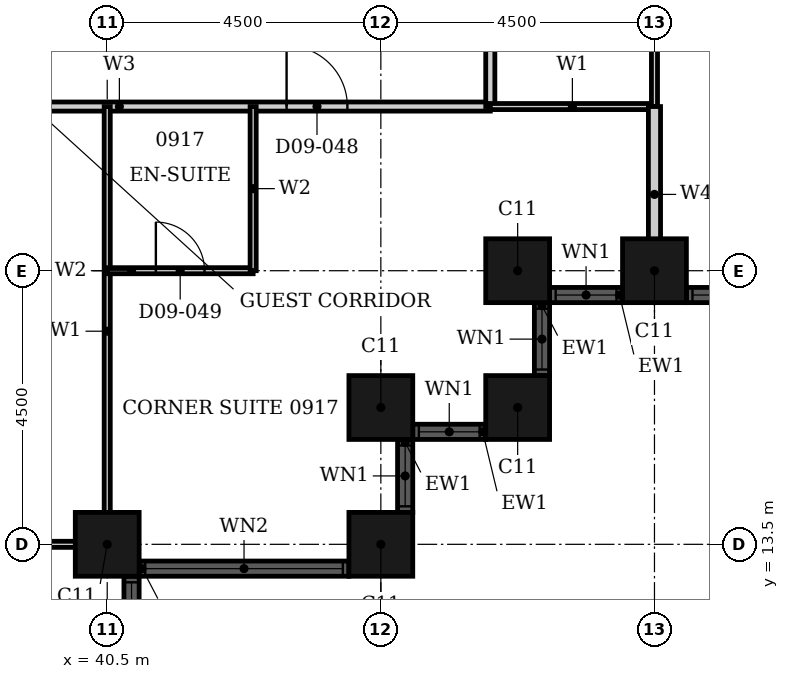
"""IFC4 building model, lengths in metres.
Left out: names, types, materials, properties, quantities, classifications, styles, units other than length and angle.
Written with IfcOpenShell. Run it as: python <this file> out.ifc"""

import sys

from ifc_helpers import new_model, si_unit, direction, frame, frame_2d, origin, origin_2d, place, context, subcontext, project, spatial, rectangle, hollow_rectangle, extrude, element, fill, save


model = new_model("IFC4")
c1 = context("Model", 3, precision=1e-05, world=origin(), true_north=direction((0.0, 1.0)))
c2 = subcontext(c1, "Body", "Model", "MODEL_VIEW")
j1 = project(units=[si_unit("LENGTHUNIT", "METRE"), si_unit("PLANEANGLEUNIT", "RADIAN")], contexts=[c1])
p1 = place(None, origin())
s1 = spatial("IfcSite", under=j1, at=p1, CompositionType="ELEMENT")
p2 = place(p1, origin())
s2 = spatial("IfcBuilding", under=s1, at=p2, CompositionType="ELEMENT")
p3 = place(p2, frame((0.0, 0.0, 44.4)))
s3 = spatial("IfcBuildingStorey", under=s2, at=p3, CompositionType="ELEMENT", Elevation=44.4)
for number, where, z_axis, x_axis in (
    (1, (40.5, 13.5, 0.0), (0.0, 0.0, 1.0), (1.0, 0.0, 0.0)),
    (2, (45.0, 13.5, 0.0), (0.0, 0.0, 1.0), (1.0, 0.0, 0.0)),
    (3, (45.0, 15.75, 0.0), (0.0, 0.0, 1.0), (1.0, 0.0, 0.0)),
    (4, (47.25, 15.75, 0.0), (0.0, 0.0, 1.0), (1.0, 0.0, 0.0)),
    (5, (47.25, 18.0, 0.0), (0.0, 0.0, 1.0), (1.0, 0.0, 0.0)),
    (6, (49.5, 18.0, 0.0), (0.0, 0.0, 1.0), (1.0, 0.0, 0.0)),
):
    element("IfcColumn", number, at=place(p3, frame(where, z_axis=z_axis, x_axis=x_axis)), inside=s3, PredefinedType="COLUMN", context=c2, shape_type="SweptSolid", body=[
        extrude(hollow_rectangle(XDim=1.05, YDim=1.05, WallThickness=0.034, at=origin_2d()), origin(), (0.0, 0.0, 1.0), 3.6),
    ])
p4 = place(p3, frame((40.9, 5.025, 0.0), z_axis=(0.0, 0.0, 1.0), x_axis=(0.0, 1.0, 0.0)))
e7 = element("IfcWall", 7, at=p4, inside=s3, PredefinedType="SOLIDWALL", context=c2, shape_type="SweptSolid", body=[
    extrude(rectangle(XDim=7.95, YDim=0.25, at=frame_2d((3.975, 0.0))), origin(), (0.0, 0.0, 1.0), 3.6),
])
p5 = place(p4, frame((0.1, 0.0, 0.9)))
e8 = element("IfcOpeningElement", 8, at=p5, cuts=e7, PredefinedType="OPENING", context=c2, shape_type="SweptSolid", body=[
    extrude(rectangle(XDim=3.25, YDim=2.08, at=frame_2d((1.625, 1.04))), frame((0.0, 0.135, 0.0), z_axis=(0.0, -1.0, 0.0), x_axis=(1.0, 0.0, 0.0)), (0.0, 0.0, 1.0), 0.27),
])
p6 = place(p4, frame((4.6, 0.0, 0.9)))
e9 = element("IfcOpeningElement", 9, at=p6, cuts=e7, PredefinedType="OPENING", context=c2, shape_type="SweptSolid", body=[
    extrude(rectangle(XDim=3.25, YDim=2.08, at=frame_2d((1.625, 1.04))), frame((0.0, 0.135, 0.0), z_axis=(0.0, -1.0, 0.0), x_axis=(1.0, 0.0, 0.0)), (0.0, 0.0, 1.0), 0.27),
])
p7 = place(p3, frame((41.025, 13.1, 0.0), z_axis=(0.0, 0.0, 1.0), x_axis=(1.0, 0.0, 0.0)))
e10 = element("IfcWall", 10, at=p7, inside=s3, PredefinedType="SOLIDWALL", context=c2, shape_type="SweptSolid", body=[
    extrude(rectangle(XDim=3.45, YDim=0.25, at=frame_2d((1.725, 0.0))), origin(), (0.0, 0.0, 1.0), 3.6),
])
p8 = place(p7, frame((0.1, 0.0, 0.9)))
e11 = element("IfcOpeningElement", 11, at=p8, cuts=e10, PredefinedType="OPENING", context=c2, shape_type="SweptSolid", body=[
    extrude(rectangle(XDim=3.25, YDim=2.08, at=frame_2d((1.625, 1.04))), frame((0.0, 0.135, 0.0), z_axis=(0.0, -1.0, 0.0), x_axis=(1.0, 0.0, 0.0)), (0.0, 0.0, 1.0), 0.27),
])
p9 = place(p3, frame((45.4, 14.025, 0.0), z_axis=(0.0, 0.0, 1.0), x_axis=(0.0, 1.0, 0.0)))
e12 = element("IfcWall", 12, at=p9, inside=s3, PredefinedType="SOLIDWALL", context=c2, shape_type="SweptSolid", body=[
    extrude(rectangle(XDim=1.2, YDim=0.25, at=frame_2d((0.6, 0.0))), origin(), (0.0, 0.0, 1.0), 3.6),
])
p10 = place(p9, frame((0.1, 0.0, 0.9)))
e13 = element("IfcOpeningElement", 13, at=p10, cuts=e12, PredefinedType="OPENING", context=c2, shape_type="SweptSolid", body=[
    extrude(rectangle(XDim=1.0, YDim=2.08, at=frame_2d((0.5, 1.04))), frame((0.0, 0.135, 0.0), z_axis=(0.0, -1.0, 0.0), x_axis=(1.0, 0.0, 0.0)), (0.0, 0.0, 1.0), 0.27),
])
p11 = place(p3, frame((45.525, 15.35, 0.0), z_axis=(0.0, 0.0, 1.0), x_axis=(1.0, 0.0, 0.0)))
e14 = element("IfcWall", 14, at=p11, inside=s3, PredefinedType="SOLIDWALL", context=c2, shape_type="SweptSolid", body=[
    extrude(rectangle(XDim=1.2, YDim=0.25, at=frame_2d((0.6, 0.0))), origin(), (0.0, 0.0, 1.0), 3.6),
])
p12 = place(p11, frame((0.1, 0.0, 0.9)))
e15 = element("IfcOpeningElement", 15, at=p12, cuts=e14, PredefinedType="OPENING", context=c2, shape_type="SweptSolid", body=[
    extrude(rectangle(XDim=1.0, YDim=2.08, at=frame_2d((0.5, 1.04))), frame((0.0, 0.135, 0.0), z_axis=(0.0, -1.0, 0.0), x_axis=(1.0, 0.0, 0.0)), (0.0, 0.0, 1.0), 0.27),
])
p13 = place(p3, frame((47.65, 16.275, 0.0), z_axis=(0.0, 0.0, 1.0), x_axis=(0.0, 1.0, 0.0)))
e16 = element("IfcWall", 16, at=p13, inside=s3, PredefinedType="SOLIDWALL", context=c2, shape_type="SweptSolid", body=[
    extrude(rectangle(XDim=1.2, YDim=0.25, at=frame_2d((0.6, 0.0))), origin(), (0.0, 0.0, 1.0), 3.6),
])
p14 = place(p13, frame((0.1, 0.0, 0.9)))
e17 = element("IfcOpeningElement", 17, at=p14, cuts=e16, PredefinedType="OPENING", context=c2, shape_type="SweptSolid", body=[
    extrude(rectangle(XDim=1.0, YDim=2.08, at=frame_2d((0.5, 1.04))), frame((0.0, 0.135, 0.0), z_axis=(0.0, -1.0, 0.0), x_axis=(1.0, 0.0, 0.0)), (0.0, 0.0, 1.0), 0.27),
])
p15 = place(p3, frame((47.775, 17.6, 0.0), z_axis=(0.0, 0.0, 1.0), x_axis=(1.0, 0.0, 0.0)))
e18 = element("IfcWall", 18, at=p15, inside=s3, PredefinedType="SOLIDWALL", context=c2, shape_type="SweptSolid", body=[
    extrude(rectangle(XDim=1.2, YDim=0.25, at=frame_2d((0.6, 0.0))), origin(), (0.0, 0.0, 1.0), 3.6),
])
p16 = place(p15, frame((0.1, 0.0, 0.9)))
e19 = element("IfcOpeningElement", 19, at=p16, cuts=e18, PredefinedType="OPENING", context=c2, shape_type="SweptSolid", body=[
    extrude(rectangle(XDim=1.0, YDim=2.08, at=frame_2d((0.5, 1.04))), frame((0.0, 0.135, 0.0), z_axis=(0.0, -1.0, 0.0), x_axis=(1.0, 0.0, 0.0)), (0.0, 0.0, 1.0), 0.27),
])
p17 = place(p3, frame((50.025, 17.6, 0.0), z_axis=(0.0, 0.0, 1.0), x_axis=(1.0, 0.0, 0.0)))
e20 = element("IfcWall", 20, at=p17, inside=s3, PredefinedType="SOLIDWALL", context=c2, shape_type="SweptSolid", body=[
    extrude(rectangle(XDim=7.95, YDim=0.25, at=frame_2d((3.975, 0.0))), origin(), (0.0, 0.0, 1.0), 3.6),
])
p18 = place(p17, frame((0.1, 0.0, 0.9)))
e21 = element("IfcOpeningElement", 21, at=p18, cuts=e20, PredefinedType="OPENING", context=c2, shape_type="SweptSolid", body=[
    extrude(rectangle(XDim=3.25, YDim=2.08, at=frame_2d((1.625, 1.04))), frame((0.0, 0.135, 0.0), z_axis=(0.0, -1.0, 0.0), x_axis=(1.0, 0.0, 0.0)), (0.0, 0.0, 1.0), 0.27),
])
p19 = place(p17, frame((4.6, 0.0, 0.9)))
e22 = element("IfcOpeningElement", 22, at=p19, cuts=e20, PredefinedType="OPENING", context=c2, shape_type="SweptSolid", body=[
    extrude(rectangle(XDim=3.25, YDim=2.08, at=frame_2d((1.625, 1.04))), frame((0.0, 0.135, 0.0), z_axis=(0.0, -1.0, 0.0), x_axis=(1.0, 0.0, 0.0)), (0.0, 0.0, 1.0), 0.27),
])
p20 = place(p3, frame((31.5, 20.7, 0.0), z_axis=(0.0, 0.0, 1.0), x_axis=(1.0, 0.0, 0.0)))
e23 = element("IfcWall", 23, at=p20, inside=s3, PredefinedType="PARTITIONING", context=c2, shape_type="SweptSolid", body=[
    extrude(rectangle(XDim=15.3, YDim=0.15, at=frame_2d((7.65, 0.0))), origin(), (0.0, 0.0, 1.0), 3.2),
])
p21 = place(p20, frame((11.95, 0.0, 0.0)))
e24 = element("IfcOpeningElement", 24, at=p21, cuts=e23, PredefinedType="OPENING", context=c2, shape_type="SweptSolid", body=[
    extrude(rectangle(XDim=1.0, YDim=2.1, at=frame_2d((0.5, 1.05))), frame((0.0, 0.085, 0.0), z_axis=(0.0, -1.0, 0.0), x_axis=(1.0, 0.0, 0.0)), (0.0, 0.0, 1.0), 0.17),
])
p22 = place(p20, frame((1.05, 0.0, 0.0)))
e25 = element("IfcOpeningElement", 25, at=p22, cuts=e23, PredefinedType="OPENING", context=c2, shape_type="SweptSolid", body=[
    extrude(rectangle(XDim=0.9, YDim=2.1, at=frame_2d((0.45, 1.05))), frame((0.0, 0.085, 0.0), z_axis=(0.0, -1.0, 0.0), x_axis=(1.0, 0.0, 0.0)), (0.0, 0.0, 1.0), 0.17),
])
p23 = place(p20, frame((5.55, 0.0, 0.0)))
e26 = element("IfcOpeningElement", 26, at=p23, cuts=e23, PredefinedType="OPENING", context=c2, shape_type="SweptSolid", body=[
    extrude(rectangle(XDim=0.9, YDim=2.1, at=frame_2d((0.45, 1.05))), frame((0.0, 0.085, 0.0), z_axis=(0.0, -1.0, 0.0), x_axis=(1.0, 0.0, 0.0)), (0.0, 0.0, 1.0), 0.17),
])
p24 = place(p3, frame((46.8, 20.7, 0.0), z_axis=(0.0, 0.0, 1.0), x_axis=(0.0, 1.0, 0.0)))
e27 = element("IfcWall", 27, at=p24, inside=s3, PredefinedType="PARTITIONING", context=c2, shape_type="SweptSolid", body=[
    extrude(rectangle(XDim=6.3, YDim=0.15, at=frame_2d((3.15, 0.0))), origin(), (0.0, 0.0, 1.0), 3.2),
])
p25 = place(p24, frame((2.65, 0.0, 0.0)))
e28 = element("IfcOpeningElement", 28, at=p25, cuts=e27, PredefinedType="OPENING", context=c2, shape_type="SweptSolid", body=[
    extrude(rectangle(XDim=0.9, YDim=2.1, at=frame_2d((0.45, 1.05))), frame((0.0, 0.085, 0.0), z_axis=(0.0, -1.0, 0.0), x_axis=(1.0, 0.0, 0.0)), (0.0, 0.0, 1.0), 0.17),
])
p26 = place(p3, frame((31.5, 13.5, 0.0), z_axis=(0.0, 0.0, 1.0), x_axis=(1.0, 0.0, 0.0)))
e29 = element("IfcWall", 29, at=p26, inside=s3, PredefinedType="PARTITIONING", context=c2, shape_type="SweptSolid", body=[
    extrude(rectangle(XDim=9.19, YDim=0.1, at=frame_2d((4.595, 0.0))), origin(), (0.0, 0.0, 1.0), 2.28),
])
p27 = place(p3, frame((46.8, 20.7, 0.0), z_axis=(0.0, 0.0, 1.0), x_axis=(1.0, 0.0, 0.0)))
e30 = element("IfcWall", 30, at=p27, inside=s3, PredefinedType="PARTITIONING", context=c2, shape_type="SweptSolid", body=[
    extrude(rectangle(XDim=2.7, YDim=0.1, at=frame_2d((1.35, 0.0))), origin(), (0.0, 0.0, 1.0), 3.2),
])
p28 = place(p3, frame((40.5, 13.31, 0.0), z_axis=(0.0, 0.0, 1.0), x_axis=(0.0, 1.0, 0.0)))
e31 = element("IfcWall", 31, at=p28, inside=s3, PredefinedType="PARTITIONING", context=c2, shape_type="SweptSolid", body=[
    extrude(rectangle(XDim=7.39, YDim=0.1, at=frame_2d((3.695, 0.0))), origin(), (0.0, 0.0, 1.0), 3.2),
])
p29 = place(p3, frame((49.5, 20.7, 0.0), z_axis=(0.0, 0.0, 1.0), x_axis=(0.0, 1.0, 0.0)))
e32 = element("IfcWall", 32, at=p29, inside=s3, PredefinedType="PARTITIONING", context=c2, shape_type="SweptSolid", body=[
    extrude(rectangle(XDim=6.3, YDim=0.1, at=frame_2d((3.15, 0.0))), origin(), (0.0, 0.0, 1.0), 2.28),
])
p30 = place(p3, frame((49.5, 17.81, 0.0), z_axis=(0.0, 0.0, 1.0), x_axis=(0.0, 1.0, 0.0)))
e33 = element("IfcWall", 33, at=p30, inside=s3, PredefinedType="PARTITIONING", context=c2, shape_type="SweptSolid", body=[
    extrude(rectangle(XDim=2.89, YDim=0.2, at=frame_2d((1.445, 0.0))), origin(), (0.0, 0.0, 1.0), 2.28),
])
p31 = place(p3, frame((40.5, 18.0, 0.0), z_axis=(0.0, 0.0, 1.0), x_axis=(1.0, 0.0, 0.0)))
e34 = element("IfcWall", 34, at=p31, inside=s3, PredefinedType="PARTITIONING", context=c2, shape_type="SweptSolid", body=[
    extrude(rectangle(XDim=2.4, YDim=0.1, at=frame_2d((1.2, 0.0))), origin(), (0.0, 0.0, 1.0), 3.2),
])
p32 = place(p31, frame((0.8, 0.0, 0.0)))
e35 = element("IfcOpeningElement", 35, at=p32, cuts=e34, PredefinedType="OPENING", context=c2, shape_type="SweptSolid", body=[
    extrude(rectangle(XDim=0.8, YDim=2.1, at=frame_2d((0.4, 1.05))), frame((0.0, 0.06, 0.0), z_axis=(0.0, -1.0, 0.0), x_axis=(1.0, 0.0, 0.0)), (0.0, 0.0, 1.0), 0.12),
])
p33 = place(p3, frame((42.9, 18.0, 0.0), z_axis=(0.0, 0.0, 1.0), x_axis=(0.0, 1.0, 0.0)))
e36 = element("IfcWall", 36, at=p33, inside=s3, PredefinedType="PARTITIONING", context=c2, shape_type="SweptSolid", body=[
    extrude(rectangle(XDim=2.7, YDim=0.1, at=frame_2d((1.35, 0.0))), origin(), (0.0, 0.0, 1.0), 3.2),
])
p34 = place(p6, origin())
e37 = element("IfcWindow", 37, at=p34, inside=s3, PartitioningType="SINGLE_PANEL", PredefinedType="WINDOW", context=c2, shape_type="SweptSolid", body=[
    extrude(rectangle(XDim=3.25, YDim=2.08, at=frame_2d((1.625, 1.04))), frame((0.0, 0.03, 0.0), z_axis=(0.0, -1.0, 0.0), x_axis=(1.0, 0.0, 0.0)), (0.0, 0.0, 1.0), 0.06),
])
fill(e9, e37)
p35 = place(p8, origin())
e38 = element("IfcWindow", 38, at=p35, inside=s3, PartitioningType="SINGLE_PANEL", PredefinedType="WINDOW", context=c2, shape_type="SweptSolid", body=[
    extrude(rectangle(XDim=3.25, YDim=2.08, at=frame_2d((1.625, 1.04))), frame((0.0, 0.03, 0.0), z_axis=(0.0, -1.0, 0.0), x_axis=(1.0, 0.0, 0.0)), (0.0, 0.0, 1.0), 0.06),
])
fill(e11, e38)
p36 = place(p10, origin())
e39 = element("IfcWindow", 39, at=p36, inside=s3, PartitioningType="SINGLE_PANEL", PredefinedType="WINDOW", context=c2, shape_type="SweptSolid", body=[
    extrude(rectangle(XDim=1.0, YDim=2.08, at=frame_2d((0.5, 1.04))), frame((0.0, 0.03, 0.0), z_axis=(0.0, -1.0, 0.0), x_axis=(1.0, 0.0, 0.0)), (0.0, 0.0, 1.0), 0.06),
])
fill(e13, e39)
p37 = place(p12, origin())
e40 = element("IfcWindow", 40, at=p37, inside=s3, PartitioningType="SINGLE_PANEL", PredefinedType="WINDOW", context=c2, shape_type="SweptSolid", body=[
    extrude(rectangle(XDim=1.0, YDim=2.08, at=frame_2d((0.5, 1.04))), frame((0.0, 0.03, 0.0), z_axis=(0.0, -1.0, 0.0), x_axis=(1.0, 0.0, 0.0)), (0.0, 0.0, 1.0), 0.06),
])
fill(e15, e40)
p38 = place(p14, origin())
e41 = element("IfcWindow", 41, at=p38, inside=s3, PartitioningType="SINGLE_PANEL", PredefinedType="WINDOW", context=c2, shape_type="SweptSolid", body=[
    extrude(rectangle(XDim=1.0, YDim=2.08, at=frame_2d((0.5, 1.04))), frame((0.0, 0.03, 0.0), z_axis=(0.0, -1.0, 0.0), x_axis=(1.0, 0.0, 0.0)), (0.0, 0.0, 1.0), 0.06),
])
fill(e17, e41)
p39 = place(p16, origin())
e42 = element("IfcWindow", 42, at=p39, inside=s3, PartitioningType="SINGLE_PANEL", PredefinedType="WINDOW", context=c2, shape_type="SweptSolid", body=[
    extrude(rectangle(XDim=1.0, YDim=2.08, at=frame_2d((0.5, 1.04))), frame((0.0, 0.03, 0.0), z_axis=(0.0, -1.0, 0.0), x_axis=(1.0, 0.0, 0.0)), (0.0, 0.0, 1.0), 0.06),
])
fill(e19, e42)
p40 = place(p18, origin())
e43 = element("IfcWindow", 43, at=p40, inside=s3, PartitioningType="SINGLE_PANEL", PredefinedType="WINDOW", context=c2, shape_type="SweptSolid", body=[
    extrude(rectangle(XDim=3.25, YDim=2.08, at=frame_2d((1.625, 1.04))), frame((0.0, 0.03, 0.0), z_axis=(0.0, -1.0, 0.0), x_axis=(1.0, 0.0, 0.0)), (0.0, 0.0, 1.0), 0.06),
])
fill(e21, e43)
p41 = place(p21, origin())
e44 = element("IfcDoor", 44, at=p41, inside=s3, OperationType="SINGLE_SWING_RIGHT", PredefinedType="DOOR", context=c2, shape_type="SweptSolid", body=[
    extrude(rectangle(XDim=1.0, YDim=2.1, at=frame_2d((0.5, 1.05))), frame((0.0, 0.025, 0.0), z_axis=(0.0, -1.0, 0.0), x_axis=(1.0, 0.0, 0.0)), (0.0, 0.0, 1.0), 0.05),
])
fill(e24, e44)
p42 = place(p32, origin())
e45 = element("IfcDoor", 45, at=p42, inside=s3, OperationType="SINGLE_SWING_RIGHT", PredefinedType="DOOR", context=c2, shape_type="SweptSolid", body=[
    extrude(rectangle(XDim=0.8, YDim=2.1, at=frame_2d((0.4, 1.05))), frame((0.0, 0.025, 0.0), z_axis=(0.0, -1.0, 0.0), x_axis=(1.0, 0.0, 0.0)), (0.0, 0.0, 1.0), 0.05),
])
fill(e35, e45)
save(model, sys.argv[1])
